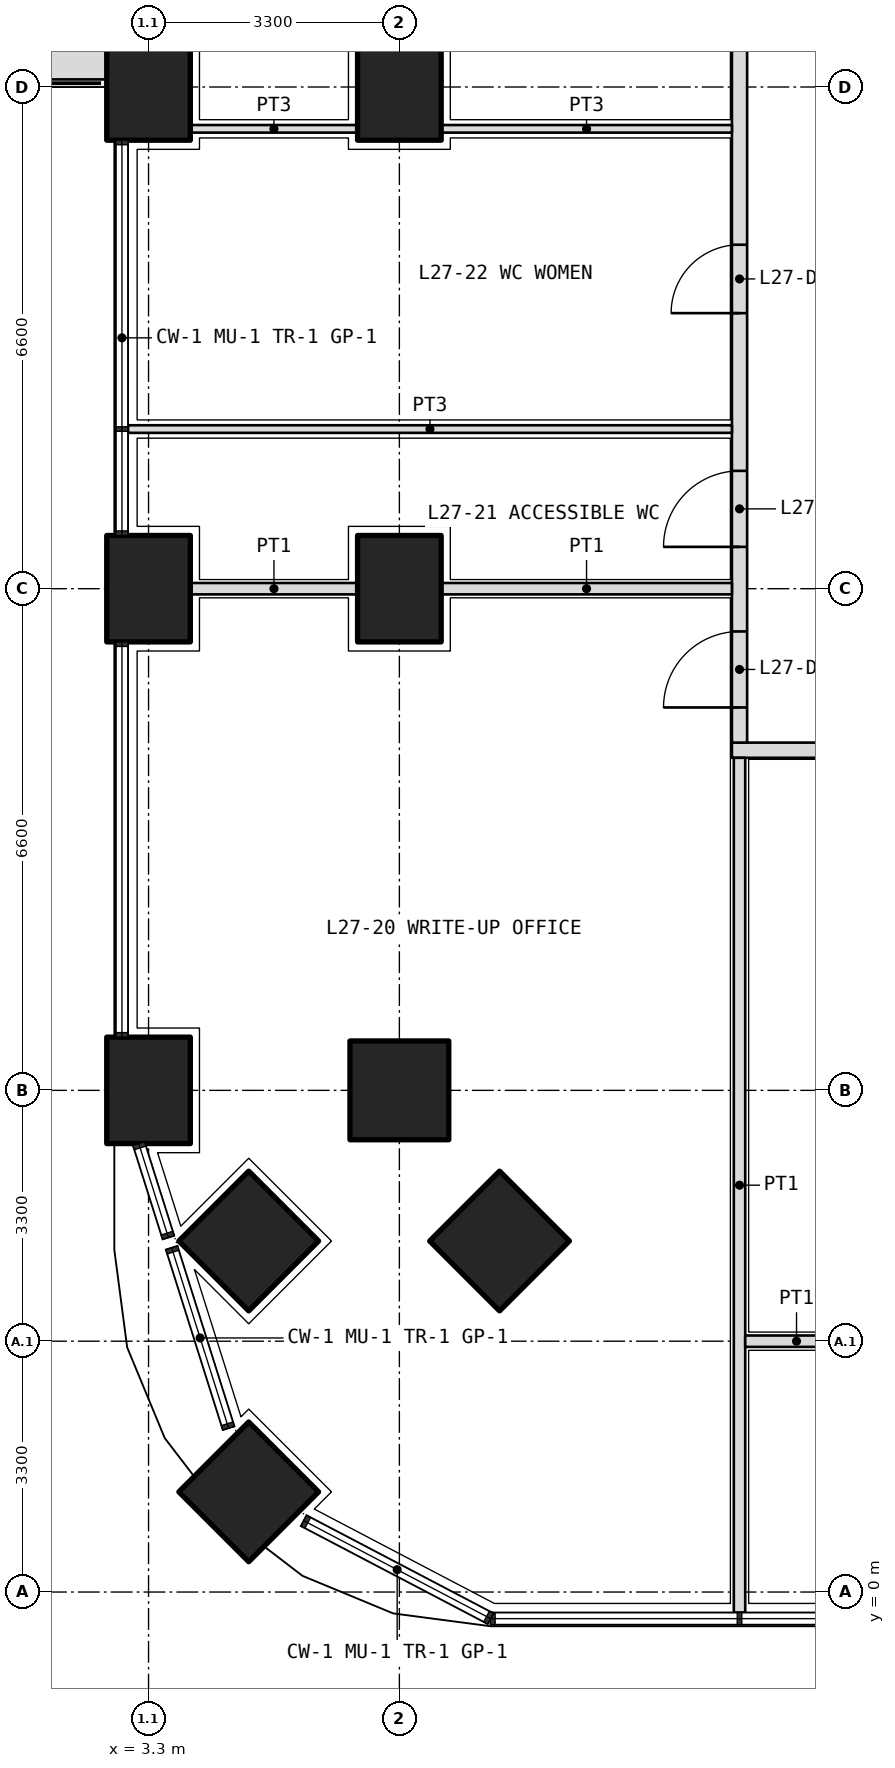
"""IFC4 building model, lengths in metres.
Left out: names, types, materials, properties, quantities, classifications, styles, units other than length and angle.
Written with IfcOpenShell. Run it as: python <this file> out.ifc"""

import sys

from ifc_helpers import new_model, si_unit, direction, frame, frame_2d, origin, origin_2d, place, context, subcontext, project, spatial, polyline, rectangle, outline, extrude, element, fill, save


model = new_model("IFC4")
c1 = context("Model", 3, precision=1e-05, world=origin(), true_north=direction((0.0, 1.0)))
c2 = subcontext(c1, "Body", "Model", "MODEL_VIEW")
j1 = project(units=[si_unit("LENGTHUNIT", "METRE"), si_unit("PLANEANGLEUNIT", "RADIAN")], contexts=[c1])
p1 = place(None, origin())
s1 = spatial("IfcSite", under=j1, at=p1, CompositionType="ELEMENT")
p2 = place(p1, origin())
s2 = spatial("IfcBuilding", under=s1, at=p2, CompositionType="ELEMENT")
p3 = place(p2, frame((0.0, 0.0, 120.0)))
s3 = spatial("IfcBuildingStorey", under=s2, at=p3, CompositionType="ELEMENT", Elevation=120.0)
p4 = place(p3, frame((4.618, 1.318, 0.0), z_axis=(0.0, 0.0, 1.0), x_axis=(0.707106781187, 0.707106781187, 0.0)))
e1 = element("IfcColumn", 1, at=p4, inside=s3, PredefinedType="COLUMN", context=c2, shape_type="SweptSolid", body=[
    extrude(rectangle(XDim=1.3, YDim=1.3, at=origin_2d()), origin(), (0.0, 0.0, 1.0), 4.2),
])
for number, where, z_axis, x_axis in (
    (2, (3.3, 6.6, 0.0), (0.0, 0.0, 1.0), (0.0, 1.0, 0.0)),
    (3, (3.3, 13.2, 0.0), (0.0, 0.0, 1.0), (0.0, 1.0, 0.0)),
    (4, (3.3, 19.8, 0.0), (0.0, 0.0, 1.0), (0.0, 1.0, 0.0)),
):
    element("IfcColumn", number, at=place(p3, frame(where, z_axis=z_axis, x_axis=x_axis)), inside=s3, PredefinedType="COLUMN", context=c2, shape_type="SweptSolid", body=[
        extrude(rectangle(XDim=1.4, YDim=1.1, at=origin_2d()), origin(), (0.0, 0.0, 1.0), 4.2),
    ])
for number, where, z_axis, x_axis in (
    (5, (6.6, 6.6, 0.0), (0.0, 0.0, 1.0), (1.0, 0.0, 0.0)),
    (6, (4.618, 4.618, 0.0), (0.0, 0.0, 1.0), (0.707, 0.707, 0.0)),
    (7, (7.918, 4.618, 0.0), (0.0, 0.0, 1.0), (0.707, 0.707, 0.0)),
):
    element("IfcColumn", number, at=place(p3, frame(where, z_axis=z_axis, x_axis=x_axis)), inside=s3, PredefinedType="COLUMN", context=c2, shape_type="SweptSolid", body=[
        extrude(rectangle(XDim=1.3, YDim=1.3, at=origin_2d()), origin(), (0.0, 0.0, 1.0), 4.2),
    ])
for number, where, z_axis, x_axis in (
    (8, (6.6, 13.2, 0.0), (0.0, 0.0, 1.0), (0.0, 1.0, 0.0)),
    (9, (6.6, 19.8, 0.0), (0.0, 0.0, 1.0), (0.0, 1.0, 0.0)),
):
    element("IfcColumn", number, at=place(p3, frame(where, z_axis=z_axis, x_axis=x_axis)), inside=s3, PredefinedType="COLUMN", context=c2, shape_type="SweptSolid", body=[
        extrude(rectangle(XDim=1.4, YDim=1.1, at=origin_2d()), origin(), (0.0, 0.0, 1.0), 4.2),
    ])
p5 = place(p3, origin())
e10 = element("IfcWall", 10, at=p5, inside=s3, PredefinedType="USERDEFINED", context=c2, shape_type="SweptSolid", body=[
    extrude(outline(polyline([(1.75, 19.9), (2.75, 19.9), (2.75, 22.35), (1.75, 22.35), (1.75, 19.9)]), holes=[polyline([(1.9, 20.05), (2.6, 20.05), (2.6, 22.2), (1.9, 22.2), (1.9, 20.05)])]), origin(), (0.0, 0.0, 1.0), 1.05),
])
p6 = place(p3, frame((10.975, 11.075, 0.0), z_axis=(0.0, 0.0, 1.0), x_axis=(1.0, 0.0, 0.0)))
e11 = element("IfcWall", 11, at=p6, inside=s3, PredefinedType="PARTITIONING", context=c2, shape_type="SweptSolid", body=[
    extrude(rectangle(XDim=30.85, YDim=0.2, at=frame_2d((15.425, 0.0))), origin(), (0.0, 0.0, 1.0), 2.85),
])
p7 = place(p6, frame((10.462, 0.0, 0.0)))
e12 = element("IfcOpeningElement", 12, at=p7, cuts=e11, PredefinedType="OPENING", context=c2, shape_type="SweptSolid", body=[
    extrude(rectangle(XDim=1.2, YDim=2.1, at=frame_2d((0.6, 1.05))), frame((0.0, 0.11, 0.0), z_axis=(0.0, -1.0, 0.0), x_axis=(1.0, 0.0, 0.0)), (0.0, 0.0, 1.0), 0.22),
])
p8 = place(p6, frame((23.625, 0.0, 0.0)))
e13 = element("IfcOpeningElement", 13, at=p8, cuts=e11, PredefinedType="OPENING", context=c2, shape_type="SweptSolid", body=[
    extrude(rectangle(XDim=1.0, YDim=2.1, at=frame_2d((0.5, 1.05))), frame((0.0, 0.11, 0.0), z_axis=(0.0, -1.0, 0.0), x_axis=(1.0, 0.0, 0.0)), (0.0, 0.0, 1.0), 0.22),
])
p9 = place(p6, frame((26.925, 0.0, 0.0)))
e14 = element("IfcOpeningElement", 14, at=p9, cuts=e11, PredefinedType="OPENING", context=c2, shape_type="SweptSolid", body=[
    extrude(rectangle(XDim=1.0, YDim=2.1, at=frame_2d((0.5, 1.05))), frame((0.0, 0.11, 0.0), z_axis=(0.0, -1.0, 0.0), x_axis=(1.0, 0.0, 0.0)), (0.0, 0.0, 1.0), 0.22),
])
p10 = place(p6, frame((29.087, 0.0, 0.0)))
e15 = element("IfcOpeningElement", 15, at=p10, cuts=e11, PredefinedType="OPENING", context=c2, shape_type="SweptSolid", body=[
    extrude(rectangle(XDim=1.2, YDim=2.1, at=frame_2d((0.6, 1.05))), frame((0.0, 0.11, 0.0), z_axis=(0.0, -1.0, 0.0), x_axis=(1.0, 0.0, 0.0)), (0.0, 0.0, 1.0), 0.22),
])
p11 = place(p3, frame((11.075, 11.175, 0.0), z_axis=(0.0, 0.0, 1.0), x_axis=(0.0, 1.0, 0.0)))
e16 = element("IfcWall", 16, at=p11, inside=s3, PredefinedType="PARTITIONING", context=c2, shape_type="SweptSolid", body=[
    extrude(rectangle(XDim=27.625, YDim=0.2, at=frame_2d((13.812, 0.0))), origin(), (0.0, 0.0, 1.0), 2.85),
])
p12 = place(p11, frame((0.462, 0.0, 0.0)))
e17 = element("IfcOpeningElement", 17, at=p12, cuts=e16, PredefinedType="OPENING", context=c2, shape_type="SweptSolid", body=[
    extrude(rectangle(XDim=1.0, YDim=2.1, at=frame_2d((0.5, 1.05))), frame((0.0, 0.11, 0.0), z_axis=(0.0, -1.0, 0.0), x_axis=(1.0, 0.0, 0.0)), (0.0, 0.0, 1.0), 0.22),
])
p13 = place(p11, frame((2.575, 0.0, 0.0)))
e18 = element("IfcOpeningElement", 18, at=p13, cuts=e16, PredefinedType="OPENING", context=c2, shape_type="SweptSolid", body=[
    extrude(rectangle(XDim=1.0, YDim=2.1, at=frame_2d((0.5, 1.05))), frame((0.0, 0.11, 0.0), z_axis=(0.0, -1.0, 0.0), x_axis=(1.0, 0.0, 0.0)), (0.0, 0.0, 1.0), 0.22),
])
p14 = place(p11, frame((5.65, 0.0, 0.0)))
e19 = element("IfcOpeningElement", 19, at=p14, cuts=e16, PredefinedType="OPENING", context=c2, shape_type="SweptSolid", body=[
    extrude(rectangle(XDim=0.9, YDim=2.1, at=frame_2d((0.45, 1.05))), frame((0.0, 0.11, 0.0), z_axis=(0.0, -1.0, 0.0), x_axis=(1.0, 0.0, 0.0)), (0.0, 0.0, 1.0), 0.22),
])
p15 = place(p11, frame((9.5, 0.0, 0.0)))
e20 = element("IfcOpeningElement", 20, at=p15, cuts=e16, PredefinedType="OPENING", context=c2, shape_type="SweptSolid", body=[
    extrude(rectangle(XDim=0.9, YDim=2.1, at=frame_2d((0.45, 1.05))), frame((0.0, 0.11, 0.0), z_axis=(0.0, -1.0, 0.0), x_axis=(1.0, 0.0, 0.0)), (0.0, 0.0, 1.0), 0.22),
])
p16 = place(p11, frame((13.025, 0.0, 0.0)))
e21 = element("IfcOpeningElement", 21, at=p16, cuts=e16, PredefinedType="OPENING", context=c2, shape_type="SweptSolid", body=[
    extrude(rectangle(XDim=1.0, YDim=2.1, at=frame_2d((0.5, 1.05))), frame((0.0, 0.11, 0.0), z_axis=(0.0, -1.0, 0.0), x_axis=(1.0, 0.0, 0.0)), (0.0, 0.0, 1.0), 0.22),
])
p17 = place(p11, frame((20.975, 0.0, 0.0)))
e22 = element("IfcOpeningElement", 22, at=p17, cuts=e16, PredefinedType="OPENING", context=c2, shape_type="SweptSolid", body=[
    extrude(rectangle(XDim=1.0, YDim=2.1, at=frame_2d((0.5, 1.05))), frame((0.0, 0.11, 0.0), z_axis=(0.0, -1.0, 0.0), x_axis=(1.0, 0.0, 0.0)), (0.0, 0.0, 1.0), 0.22),
])
p18 = place(p3, frame((11.075, -0.27, 0.0), z_axis=(0.0, 0.0, 1.0), x_axis=(0.0, 1.0, 0.0)))
e23 = element("IfcWall", 23, at=p18, inside=s3, PredefinedType="PARTITIONING", context=c2, shape_type="SweptSolid", body=[
    extrude(rectangle(XDim=11.245, YDim=0.15, at=frame_2d((5.623, 0.0))), origin(), (0.0, 0.0, 1.0), 2.7),
])
p19 = place(p3, frame((11.15, 3.3, 0.0), z_axis=(0.0, 0.0, 1.0), x_axis=(1.0, 0.0, 0.0)))
e24 = element("IfcWall", 24, at=p19, inside=s3, PredefinedType="PARTITIONING", context=c2, shape_type="SweptSolid", body=[
    extrude(rectangle(XDim=1.35, YDim=0.15, at=frame_2d((0.675, 0.0))), origin(), (0.0, 0.0, 1.0), 3.9),
])
p20 = place(p3, frame((3.03, 15.3, 0.0), z_axis=(0.0, 0.0, 1.0), x_axis=(1.0, 0.0, 0.0)))
e25 = element("IfcWall", 25, at=p20, inside=s3, PredefinedType="PARTITIONING", context=c2, shape_type="SweptSolid", body=[
    extrude(rectangle(XDim=7.945, YDim=0.1, at=frame_2d((3.973, 0.0))), origin(), (0.0, 0.0, 1.0), 2.7),
])
p21 = place(p3, frame((3.85, 19.25, 0.0), z_axis=(0.0, 0.0, 1.0), x_axis=(1.0, 0.0, 0.0)))
e26 = element("IfcWall", 26, at=p21, inside=s3, PredefinedType="PARTITIONING", context=c2, shape_type="SweptSolid", body=[
    extrude(rectangle(XDim=2.2, YDim=0.1, at=frame_2d((1.1, 0.0))), origin(), (0.0, 0.0, 1.0), 2.85),
])
p22 = place(p3, frame((7.15, 19.25, 0.0), z_axis=(0.0, 0.0, 1.0), x_axis=(1.0, 0.0, 0.0)))
e27 = element("IfcWall", 27, at=p22, inside=s3, PredefinedType="PARTITIONING", context=c2, shape_type="SweptSolid", body=[
    extrude(rectangle(XDim=3.825, YDim=0.1, at=frame_2d((1.913, 0.0))), origin(), (0.0, 0.0, 1.0), 2.85),
])
p23 = place(p3, frame((3.85, 13.2, 0.0), z_axis=(0.0, 0.0, 1.0), x_axis=(1.0, 0.0, 0.0)))
e28 = element("IfcWall", 28, at=p23, inside=s3, PredefinedType="PARTITIONING", context=c2, shape_type="SweptSolid", body=[
    extrude(rectangle(XDim=2.2, YDim=0.15, at=frame_2d((1.1, 0.0))), origin(), (0.0, 0.0, 1.0), 2.85),
])
p24 = place(p3, frame((7.15, 13.2, 0.0), z_axis=(0.0, 0.0, 1.0), x_axis=(1.0, 0.0, 0.0)))
e29 = element("IfcWall", 29, at=p24, inside=s3, PredefinedType="PARTITIONING", context=c2, shape_type="SweptSolid", body=[
    extrude(rectangle(XDim=3.825, YDim=0.15, at=frame_2d((1.913, 0.0))), origin(), (0.0, 0.0, 1.0), 2.85),
])
p25 = place(p12, origin())
e30 = element("IfcDoor", 30, at=p25, inside=s3, OperationType="SINGLE_SWING_LEFT", PredefinedType="DOOR", context=c2, shape_type="SweptSolid", body=[
    extrude(rectangle(XDim=1.0, YDim=2.1, at=frame_2d((0.5, 1.05))), frame((0.0, 0.025, 0.0), z_axis=(0.0, -1.0, 0.0), x_axis=(1.0, 0.0, 0.0)), (0.0, 0.0, 1.0), 0.05),
])
fill(e17, e30)
p26 = place(p13, origin())
e31 = element("IfcDoor", 31, at=p26, inside=s3, OperationType="SINGLE_SWING_LEFT", PredefinedType="DOOR", context=c2, shape_type="SweptSolid", body=[
    extrude(rectangle(XDim=1.0, YDim=2.1, at=frame_2d((0.5, 1.05))), frame((0.0, 0.025, 0.0), z_axis=(0.0, -1.0, 0.0), x_axis=(1.0, 0.0, 0.0)), (0.0, 0.0, 1.0), 0.05),
])
fill(e18, e31)
p27 = place(p14, origin())
e32 = element("IfcDoor", 32, at=p27, inside=s3, OperationType="SINGLE_SWING_LEFT", PredefinedType="DOOR", context=c2, shape_type="SweptSolid", body=[
    extrude(rectangle(XDim=0.9, YDim=2.1, at=frame_2d((0.45, 1.05))), frame((0.0, 0.025, 0.0), z_axis=(0.0, -1.0, 0.0), x_axis=(1.0, 0.0, 0.0)), (0.0, 0.0, 1.0), 0.05),
])
fill(e19, e32)
save(model, sys.argv[1])
